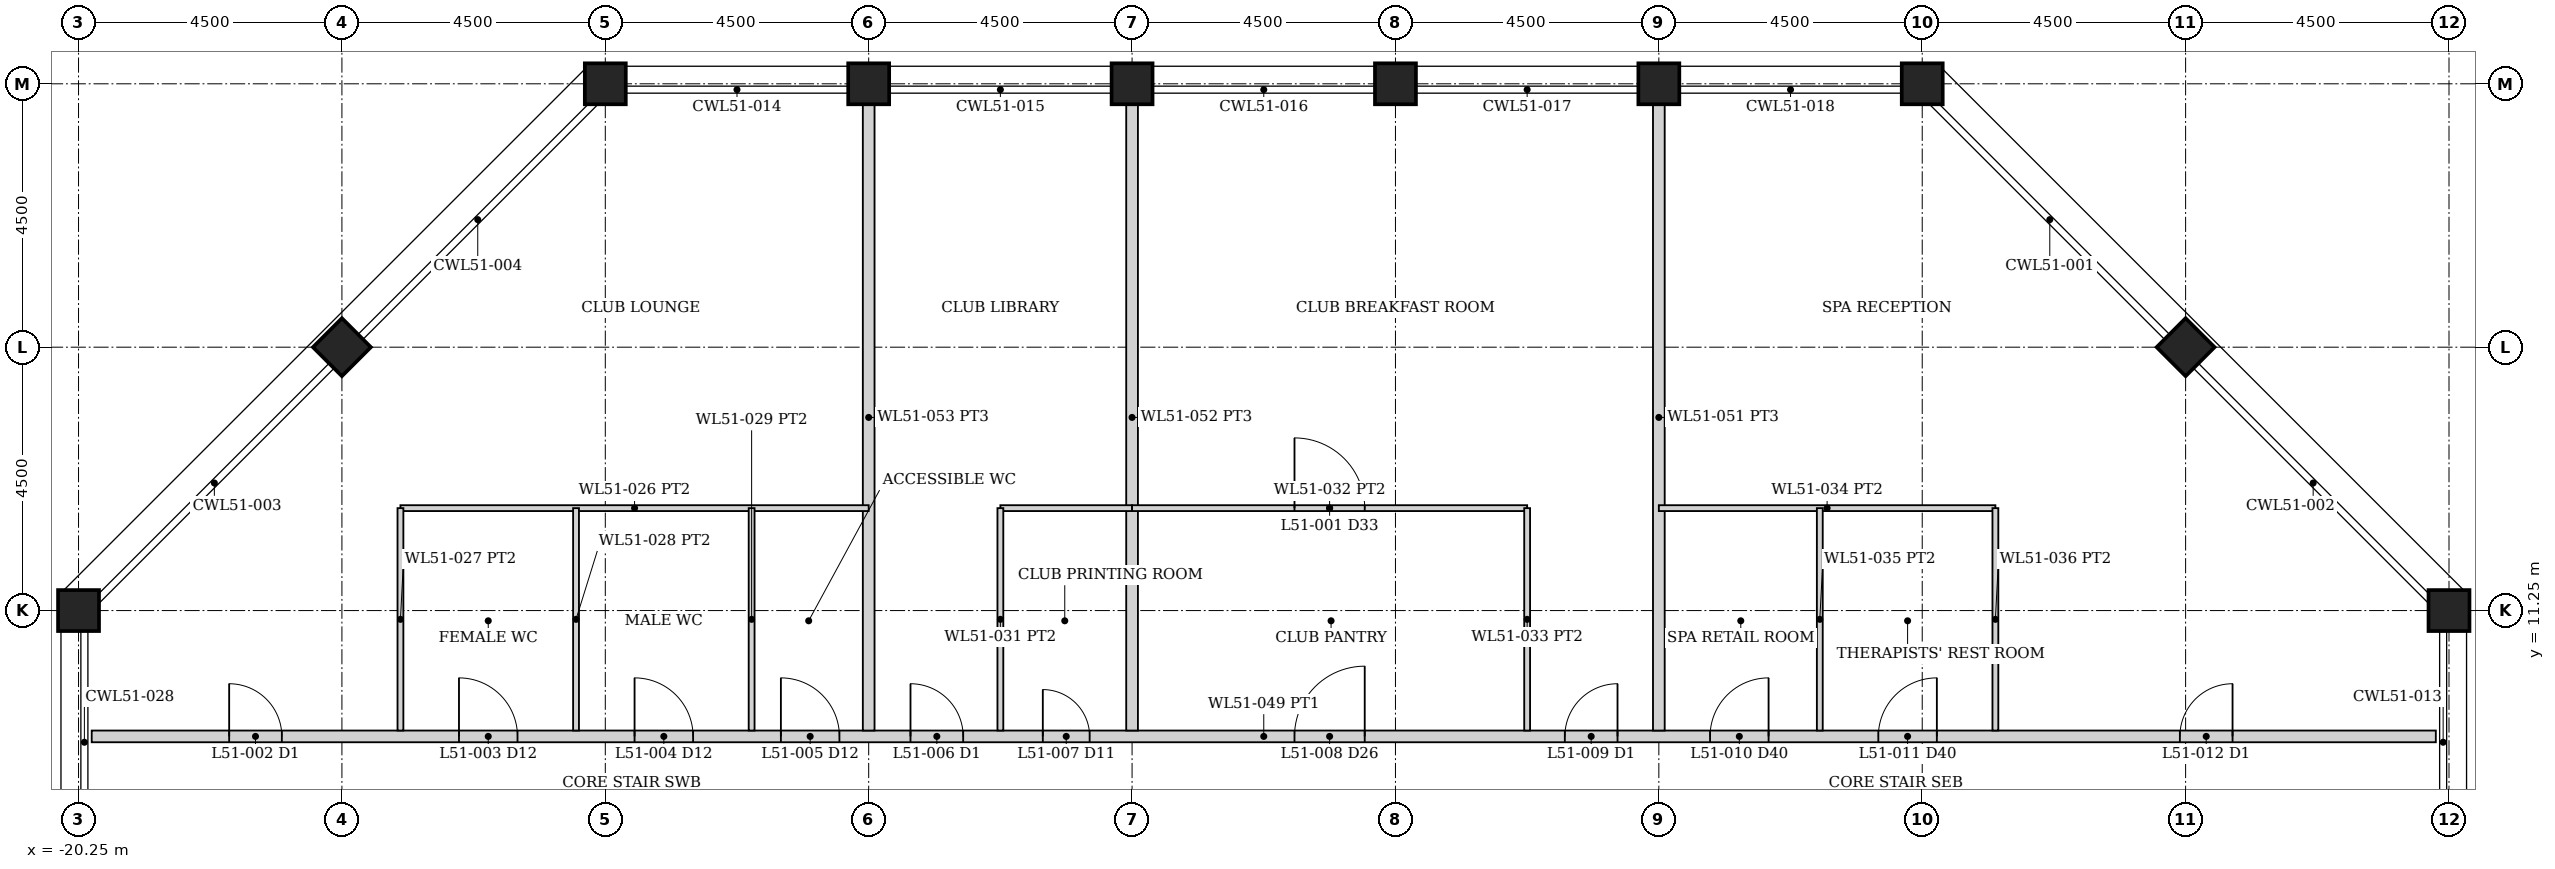
"""IFC4 building model, lengths in metres.
Left out: names, types, materials, properties, quantities, classifications, styles, units other than length and angle.
Written with IfcOpenShell. Run it as: python <this file> out.ifc"""

import sys

from ifc_helpers import new_model, si_unit, direction, frame, frame_2d, origin, origin_2d, place, context, subcontext, project, spatial, rectangle, hollow_rectangle, extrude, element, fill, save


model = new_model("IFC4")
c1 = context("Model", 3, precision=1e-05, world=origin(), true_north=direction((0.0, 1.0)))
c2 = subcontext(c1, "Body", "Model", "MODEL_VIEW")
j1 = project(units=[si_unit("LENGTHUNIT", "METRE"), si_unit("PLANEANGLEUNIT", "RADIAN")], contexts=[c1])
p1 = place(None, origin())
s1 = spatial("IfcSite", under=j1, at=p1, CompositionType="ELEMENT")
p2 = place(p1, origin())
s2 = spatial("IfcBuilding", under=s1, at=p2, CompositionType="ELEMENT")
p3 = place(p2, frame((0.0, 0.0, 195.8)))
s3 = spatial("IfcBuildingStorey", under=s2, at=p3, CompositionType="ELEMENT", Elevation=195.8)
for number, where, z_axis, x_axis in (
    (1, (-11.25, 20.25, 0.0), (0.0, 0.0, 1.0), (0.0, 1.0, 0.0)),
    (2, (-6.75, 20.25, 0.0), (0.0, 0.0, 1.0), (0.0, 1.0, 0.0)),
    (3, (-2.25, 20.25, 0.0), (0.0, 0.0, 1.0), (0.0, 1.0, 0.0)),
    (4, (2.25, 20.25, 0.0), (0.0, 0.0, 1.0), (0.0, 1.0, 0.0)),
    (5, (6.75, 20.25, 0.0), (0.0, 0.0, 1.0), (0.0, 1.0, 0.0)),
    (6, (11.25, 20.25, 0.0), (0.0, 0.0, 1.0), (0.0, 1.0, 0.0)),
    (7, (20.25, 11.25, 0.0), (0.0, 0.0, 1.0), (1.0, 0.0, 0.0)),
    (8, (-20.25, 11.25, 0.0), (0.0, 0.0, 1.0), (1.0, 0.0, 0.0)),
    (9, (15.75, 15.75, 0.0), (0.0, 0.0, 1.0), (0.707, 0.707, 0.0)),
    (10, (-15.75, 15.75, 0.0), (0.0, 0.0, 1.0), (0.707, -0.707, 0.0)),
):
    element("IfcColumn", number, at=place(p3, frame(where, z_axis=z_axis, x_axis=x_axis)), inside=s3, PredefinedType="COLUMN", context=c2, shape_type="SweptSolid", body=[
        extrude(hollow_rectangle(XDim=0.7, YDim=0.7, WallThickness=0.045, at=origin_2d()), origin(), (0.0, 0.0, 1.0), 5.0),
    ])
p4 = place(p3, frame((-20.025, 9.1, 0.0), z_axis=(0.0, 0.0, 1.0), x_axis=(1.0, 0.0, 0.0)))
e11 = element("IfcWall", 11, at=p4, inside=s3, PredefinedType="PARTITIONING", context=c2, shape_type="SweptSolid", body=[
    extrude(rectangle(XDim=40.05, YDim=0.2, at=frame_2d((20.025, 0.0))), origin(), (0.0, 0.0, 1.0), 3.873),
])
p5 = place(p4, frame((2.349, 0.0, 0.0)))
e12 = element("IfcOpeningElement", 12, at=p5, cuts=e11, PredefinedType="OPENING", context=c2, shape_type="SweptSolid", body=[
    extrude(rectangle(XDim=0.9, YDim=2.1, at=frame_2d((0.45, 1.05))), frame((0.0, 0.11, 0.0), z_axis=(0.0, -1.0, 0.0), x_axis=(1.0, 0.0, 0.0)), (0.0, 0.0, 1.0), 0.22),
])
p6 = place(p4, frame((6.275, 0.0, 0.0)))
e13 = element("IfcOpeningElement", 13, at=p6, cuts=e11, PredefinedType="OPENING", context=c2, shape_type="SweptSolid", body=[
    extrude(rectangle(XDim=1.0, YDim=2.1, at=frame_2d((0.5, 1.05))), frame((0.0, 0.11, 0.0), z_axis=(0.0, -1.0, 0.0), x_axis=(1.0, 0.0, 0.0)), (0.0, 0.0, 1.0), 0.22),
])
p7 = place(p4, frame((9.275, 0.0, 0.0)))
e14 = element("IfcOpeningElement", 14, at=p7, cuts=e11, PredefinedType="OPENING", context=c2, shape_type="SweptSolid", body=[
    extrude(rectangle(XDim=1.0, YDim=2.1, at=frame_2d((0.5, 1.05))), frame((0.0, 0.11, 0.0), z_axis=(0.0, -1.0, 0.0), x_axis=(1.0, 0.0, 0.0)), (0.0, 0.0, 1.0), 0.22),
])
p8 = place(p4, frame((11.775, 0.0, 0.0)))
e15 = element("IfcOpeningElement", 15, at=p8, cuts=e11, PredefinedType="OPENING", context=c2, shape_type="SweptSolid", body=[
    extrude(rectangle(XDim=1.0, YDim=2.1, at=frame_2d((0.5, 1.05))), frame((0.0, 0.11, 0.0), z_axis=(0.0, -1.0, 0.0), x_axis=(1.0, 0.0, 0.0)), (0.0, 0.0, 1.0), 0.22),
])
p9 = place(p4, frame((13.989, 0.0, 0.0)))
e16 = element("IfcOpeningElement", 16, at=p9, cuts=e11, PredefinedType="OPENING", context=c2, shape_type="SweptSolid", body=[
    extrude(rectangle(XDim=0.9, YDim=2.1, at=frame_2d((0.45, 1.05))), frame((0.0, 0.11, 0.0), z_axis=(0.0, -1.0, 0.0), x_axis=(1.0, 0.0, 0.0)), (0.0, 0.0, 1.0), 0.22),
])
p10 = place(p4, frame((16.25, 0.0, 0.0)))
e17 = element("IfcOpeningElement", 17, at=p10, cuts=e11, PredefinedType="OPENING", context=c2, shape_type="SweptSolid", body=[
    extrude(rectangle(XDim=0.8, YDim=2.1, at=frame_2d((0.4, 1.05))), frame((0.0, 0.11, 0.0), z_axis=(0.0, -1.0, 0.0), x_axis=(1.0, 0.0, 0.0)), (0.0, 0.0, 1.0), 0.22),
])
p11 = place(p4, frame((25.169, 0.0, 0.0)))
e18 = element("IfcOpeningElement", 18, at=p11, cuts=e11, PredefinedType="OPENING", context=c2, shape_type="SweptSolid", body=[
    extrude(rectangle(XDim=0.9, YDim=2.1, at=frame_2d((0.45, 1.05))), frame((0.0, 0.11, 0.0), z_axis=(0.0, -1.0, 0.0), x_axis=(1.0, 0.0, 0.0)), (0.0, 0.0, 1.0), 0.22),
])
p12 = place(p4, frame((20.55, 0.0, 0.0)))
e19 = element("IfcOpeningElement", 19, at=p12, cuts=e11, PredefinedType="OPENING", context=c2, shape_type="SweptSolid", body=[
    extrude(rectangle(XDim=1.2, YDim=2.1, at=frame_2d((0.6, 1.05))), frame((0.0, 0.11, 0.0), z_axis=(0.0, -1.0, 0.0), x_axis=(1.0, 0.0, 0.0)), (0.0, 0.0, 1.0), 0.22),
])
p13 = place(p4, frame((35.677, 0.0, 0.0)))
e20 = element("IfcOpeningElement", 20, at=p13, cuts=e11, PredefinedType="OPENING", context=c2, shape_type="SweptSolid", body=[
    extrude(rectangle(XDim=0.9, YDim=2.1, at=frame_2d((0.45, 1.05))), frame((0.0, 0.11, 0.0), z_axis=(0.0, -1.0, 0.0), x_axis=(1.0, 0.0, 0.0)), (0.0, 0.0, 1.0), 0.22),
])
p14 = place(p4, frame((27.65, 0.0, 0.0)))
e21 = element("IfcOpeningElement", 21, at=p14, cuts=e11, PredefinedType="OPENING", context=c2, shape_type="SweptSolid", body=[
    extrude(rectangle(XDim=1.0, YDim=2.1, at=frame_2d((0.5, 1.05))), frame((0.0, 0.11, 0.0), z_axis=(0.0, -1.0, 0.0), x_axis=(1.0, 0.0, 0.0)), (0.0, 0.0, 1.0), 0.22),
])
p15 = place(p4, frame((30.525, 0.0, 0.0)))
e22 = element("IfcOpeningElement", 22, at=p15, cuts=e11, PredefinedType="OPENING", context=c2, shape_type="SweptSolid", body=[
    extrude(rectangle(XDim=1.0, YDim=2.1, at=frame_2d((0.5, 1.05))), frame((0.0, 0.11, 0.0), z_axis=(0.0, -1.0, 0.0), x_axis=(1.0, 0.0, 0.0)), (0.0, 0.0, 1.0), 0.22),
])
for number, where, z_axis, x_axis in (
    (23, (-6.75, 9.2, 0.0), (0.0, 0.0, 1.0), (0.0, 1.0, 0.0)),
    (24, (-2.25, 9.2, 0.0), (0.0, 0.0, 1.0), (0.0, 1.0, 0.0)),
    (25, (6.75, 9.2, 0.0), (0.0, 0.0, 1.0), (0.0, 1.0, 0.0)),
):
    element("IfcWall", number, at=place(p3, frame(where, z_axis=z_axis, x_axis=x_axis)), inside=s3, PredefinedType="PARTITIONING", context=c2, shape_type="SweptSolid", body=[
        extrude(rectangle(XDim=10.7, YDim=0.2, at=frame_2d((5.35, 0.0))), origin(), (0.0, 0.0, 1.0), 3.873),
    ])
p16 = place(p3, frame((-14.75, 13.0, 0.0), z_axis=(0.0, 0.0, 1.0), x_axis=(1.0, 0.0, 0.0)))
e26 = element("IfcWall", 26, at=p16, inside=s3, PredefinedType="PARTITIONING", context=c2, shape_type="SweptSolid", body=[
    extrude(rectangle(XDim=8.0, YDim=0.1, at=frame_2d((4.0, 0.0))), origin(), (0.0, 0.0, 1.0), 3.873),
])
for number, where, z_axis, x_axis in (
    (27, (-14.75, 9.2, 0.0), (0.0, 0.0, 1.0), (0.0, 1.0, 0.0)),
    (28, (-11.75, 9.2, 0.0), (0.0, 0.0, 1.0), (0.0, 1.0, 0.0)),
    (29, (-8.75, 9.2, 0.0), (0.0, 0.0, 1.0), (0.0, 1.0, 0.0)),
):
    element("IfcWall", number, at=place(p3, frame(where, z_axis=z_axis, x_axis=x_axis)), inside=s3, PredefinedType="PARTITIONING", context=c2, shape_type="SweptSolid", body=[
        extrude(rectangle(XDim=3.8, YDim=0.1, at=frame_2d((1.9, 0.0))), origin(), (0.0, 0.0, 1.0), 3.873),
    ])
p17 = place(p3, frame((-4.5, 13.0, 0.0), z_axis=(0.0, 0.0, 1.0), x_axis=(1.0, 0.0, 0.0)))
e30 = element("IfcWall", 30, at=p17, inside=s3, PredefinedType="PARTITIONING", context=c2, shape_type="SweptSolid", body=[
    extrude(rectangle(XDim=2.25, YDim=0.1, at=frame_2d((1.125, 0.0))), origin(), (0.0, 0.0, 1.0), 3.873),
])
p18 = place(p3, frame((-4.5, 9.2, 0.0), z_axis=(0.0, 0.0, 1.0), x_axis=(0.0, 1.0, 0.0)))
e31 = element("IfcWall", 31, at=p18, inside=s3, PredefinedType="PARTITIONING", context=c2, shape_type="SweptSolid", body=[
    extrude(rectangle(XDim=3.8, YDim=0.1, at=frame_2d((1.9, 0.0))), origin(), (0.0, 0.0, 1.0), 3.873),
])
p19 = place(p3, frame((-2.25, 13.0, 0.0), z_axis=(0.0, 0.0, 1.0), x_axis=(1.0, 0.0, 0.0)))
e32 = element("IfcWall", 32, at=p19, inside=s3, PredefinedType="PARTITIONING", context=c2, shape_type="SweptSolid", body=[
    extrude(rectangle(XDim=6.75, YDim=0.1, at=frame_2d((3.375, 0.0))), origin(), (0.0, 0.0, 1.0), 3.873),
])
p20 = place(p19, frame((2.775, 0.0, 0.0)))
e33 = element("IfcOpeningElement", 33, at=p20, cuts=e32, PredefinedType="OPENING", context=c2, shape_type="SweptSolid", body=[
    extrude(rectangle(XDim=1.2, YDim=2.1, at=frame_2d((0.6, 1.05))), frame((0.0, 0.06, 0.0), z_axis=(0.0, -1.0, 0.0), x_axis=(1.0, 0.0, 0.0)), (0.0, 0.0, 1.0), 0.12),
])
p21 = place(p3, frame((4.5, 9.2, 0.0), z_axis=(0.0, 0.0, 1.0), x_axis=(0.0, 1.0, 0.0)))
e34 = element("IfcWall", 34, at=p21, inside=s3, PredefinedType="PARTITIONING", context=c2, shape_type="SweptSolid", body=[
    extrude(rectangle(XDim=3.8, YDim=0.1, at=frame_2d((1.9, 0.0))), origin(), (0.0, 0.0, 1.0), 3.873),
])
p22 = place(p3, frame((6.75, 13.0, 0.0), z_axis=(0.0, 0.0, 1.0), x_axis=(1.0, 0.0, 0.0)))
e35 = element("IfcWall", 35, at=p22, inside=s3, PredefinedType="PARTITIONING", context=c2, shape_type="SweptSolid", body=[
    extrude(rectangle(XDim=5.75, YDim=0.1, at=frame_2d((2.875, 0.0))), origin(), (0.0, 0.0, 1.0), 3.873),
])
for number, where, z_axis, x_axis in (
    (36, (9.5, 9.2, 0.0), (0.0, 0.0, 1.0), (0.0, 1.0, 0.0)),
    (37, (12.5, 9.2, 0.0), (0.0, 0.0, 1.0), (0.0, 1.0, 0.0)),
):
    element("IfcWall", number, at=place(p3, frame(where, z_axis=z_axis, x_axis=x_axis)), inside=s3, PredefinedType="PARTITIONING", context=c2, shape_type="SweptSolid", body=[
        extrude(rectangle(XDim=3.8, YDim=0.1, at=frame_2d((1.9, 0.0))), origin(), (0.0, 0.0, 1.0), 3.873),
    ])
p23 = place(p5, origin())
e38 = element("IfcDoor", 38, at=p23, inside=s3, OperationType="SINGLE_SWING_LEFT", PredefinedType="DOOR", context=c2, shape_type="SweptSolid", body=[
    extrude(rectangle(XDim=0.9, YDim=2.1, at=frame_2d((0.45, 1.05))), frame((0.0, 0.025, 0.0), z_axis=(0.0, -1.0, 0.0), x_axis=(1.0, 0.0, 0.0)), (0.0, 0.0, 1.0), 0.05),
])
fill(e12, e38)
p24 = place(p6, origin())
e39 = element("IfcDoor", 39, at=p24, inside=s3, OperationType="SINGLE_SWING_LEFT", PredefinedType="DOOR", context=c2, shape_type="SweptSolid", body=[
    extrude(rectangle(XDim=1.0, YDim=2.1, at=frame_2d((0.5, 1.05))), frame((0.0, 0.025, 0.0), z_axis=(0.0, -1.0, 0.0), x_axis=(1.0, 0.0, 0.0)), (0.0, 0.0, 1.0), 0.05),
])
fill(e13, e39)
p25 = place(p7, origin())
e40 = element("IfcDoor", 40, at=p25, inside=s3, OperationType="SINGLE_SWING_LEFT", PredefinedType="DOOR", context=c2, shape_type="SweptSolid", body=[
    extrude(rectangle(XDim=1.0, YDim=2.1, at=frame_2d((0.5, 1.05))), frame((0.0, 0.025, 0.0), z_axis=(0.0, -1.0, 0.0), x_axis=(1.0, 0.0, 0.0)), (0.0, 0.0, 1.0), 0.05),
])
fill(e14, e40)
p26 = place(p8, origin())
e41 = element("IfcDoor", 41, at=p26, inside=s3, OperationType="SINGLE_SWING_LEFT", PredefinedType="DOOR", context=c2, shape_type="SweptSolid", body=[
    extrude(rectangle(XDim=1.0, YDim=2.1, at=frame_2d((0.5, 1.05))), frame((0.0, 0.025, 0.0), z_axis=(0.0, -1.0, 0.0), x_axis=(1.0, 0.0, 0.0)), (0.0, 0.0, 1.0), 0.05),
])
fill(e15, e41)
p27 = place(p9, origin())
e42 = element("IfcDoor", 42, at=p27, inside=s3, OperationType="SINGLE_SWING_LEFT", PredefinedType="DOOR", context=c2, shape_type="SweptSolid", body=[
    extrude(rectangle(XDim=0.9, YDim=2.1, at=frame_2d((0.45, 1.05))), frame((0.0, 0.025, 0.0), z_axis=(0.0, -1.0, 0.0), x_axis=(1.0, 0.0, 0.0)), (0.0, 0.0, 1.0), 0.05),
])
fill(e16, e42)
p28 = place(p10, origin())
e43 = element("IfcDoor", 43, at=p28, inside=s3, OperationType="SINGLE_SWING_LEFT", PredefinedType="DOOR", context=c2, shape_type="SweptSolid", body=[
    extrude(rectangle(XDim=0.8, YDim=2.1, at=frame_2d((0.4, 1.05))), frame((0.0, 0.025, 0.0), z_axis=(0.0, -1.0, 0.0), x_axis=(1.0, 0.0, 0.0)), (0.0, 0.0, 1.0), 0.05),
])
fill(e17, e43)
p29 = place(p11, origin())
e44 = element("IfcDoor", 44, at=p29, inside=s3, OperationType="SINGLE_SWING_RIGHT", PredefinedType="DOOR", context=c2, shape_type="SweptSolid", body=[
    extrude(rectangle(XDim=0.9, YDim=2.1, at=frame_2d((0.45, 1.05))), frame((0.0, 0.025, 0.0), z_axis=(0.0, -1.0, 0.0), x_axis=(1.0, 0.0, 0.0)), (0.0, 0.0, 1.0), 0.05),
])
fill(e18, e44)
p30 = place(p20, origin())
e45 = element("IfcDoor", 45, at=p30, inside=s3, OperationType="SINGLE_SWING_LEFT", PredefinedType="DOOR", context=c2, shape_type="SweptSolid", body=[
    extrude(rectangle(XDim=1.2, YDim=2.1, at=frame_2d((0.6, 1.05))), frame((0.0, 0.025, 0.0), z_axis=(0.0, -1.0, 0.0), x_axis=(1.0, 0.0, 0.0)), (0.0, 0.0, 1.0), 0.05),
])
fill(e33, e45)
p31 = place(p12, origin())
e46 = element("IfcDoor", 46, at=p31, inside=s3, OperationType="SINGLE_SWING_RIGHT", PredefinedType="DOOR", context=c2, shape_type="SweptSolid", body=[
    extrude(rectangle(XDim=1.2, YDim=2.1, at=frame_2d((0.6, 1.05))), frame((0.0, 0.025, 0.0), z_axis=(0.0, -1.0, 0.0), x_axis=(1.0, 0.0, 0.0)), (0.0, 0.0, 1.0), 0.05),
])
fill(e19, e46)
p32 = place(p13, origin())
e47 = element("IfcDoor", 47, at=p32, inside=s3, OperationType="SINGLE_SWING_RIGHT", PredefinedType="DOOR", context=c2, shape_type="SweptSolid", body=[
    extrude(rectangle(XDim=0.9, YDim=2.1, at=frame_2d((0.45, 1.05))), frame((0.0, 0.025, 0.0), z_axis=(0.0, -1.0, 0.0), x_axis=(1.0, 0.0, 0.0)), (0.0, 0.0, 1.0), 0.05),
])
fill(e20, e47)
p33 = place(p14, origin())
e48 = element("IfcDoor", 48, at=p33, inside=s3, OperationType="SINGLE_SWING_RIGHT", PredefinedType="DOOR", context=c2, shape_type="SweptSolid", body=[
    extrude(rectangle(XDim=1.0, YDim=2.1, at=frame_2d((0.5, 1.05))), frame((0.0, 0.025, 0.0), z_axis=(0.0, -1.0, 0.0), x_axis=(1.0, 0.0, 0.0)), (0.0, 0.0, 1.0), 0.05),
])
fill(e21, e48)
p34 = place(p15, origin())
e49 = element("IfcDoor", 49, at=p34, inside=s3, OperationType="SINGLE_SWING_RIGHT", PredefinedType="DOOR", context=c2, shape_type="SweptSolid", body=[
    extrude(rectangle(XDim=1.0, YDim=2.1, at=frame_2d((0.5, 1.05))), frame((0.0, 0.025, 0.0), z_axis=(0.0, -1.0, 0.0), x_axis=(1.0, 0.0, 0.0)), (0.0, 0.0, 1.0), 0.05),
])
fill(e22, e49)
save(model, sys.argv[1])
